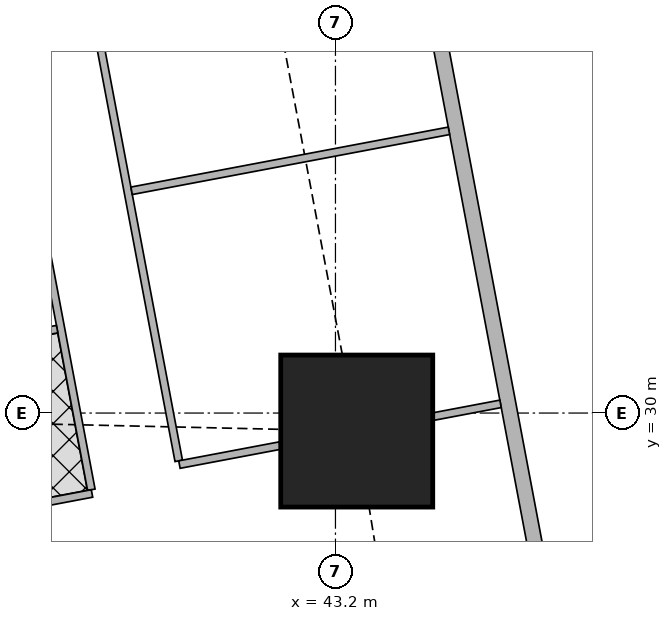
"""IFC4 building model, lengths in metres.
Left out: names, types, materials, properties, quantities, classifications, styles, units other than length and angle.
Written with IfcOpenShell. Run it as: python <this file> out.ifc"""

import sys

from ifc_helpers import new_model, si_unit, direction, frame, frame_2d, origin, origin_2d, place, context, subcontext, project, spatial, rectangle, extrude, element, fill, save


model = new_model("IFC4")
c1 = context("Model", 3, precision=1e-05, world=origin(), true_north=direction((0.0, 1.0)))
c2 = subcontext(c1, "Body", "Model", "MODEL_VIEW")
j1 = project(units=[si_unit("LENGTHUNIT", "METRE"), si_unit("PLANEANGLEUNIT", "RADIAN")], contexts=[c1])
p1 = place(None, origin())
s1 = spatial("IfcSite", under=j1, at=p1, CompositionType="ELEMENT")
p2 = place(p1, origin())
s2 = spatial("IfcBuilding", under=s1, at=p2, CompositionType="ELEMENT")
p3 = place(p2, frame((0.0, 0.0, 262.85)))
s3 = spatial("IfcBuildingStorey", under=s2, at=p3, CompositionType="ELEMENT", Elevation=262.85)
p4 = place(p3, frame((43.48, 29.763, 0.0), z_axis=(0.0, 0.0, 1.0), x_axis=(1.0, 0.0, 0.0)))
e1 = element("IfcColumn", 1, at=p4, inside=s3, PredefinedType="COLUMN", context=c2, shape_type="SweptSolid", body=[
    extrude(rectangle(XDim=2.0, YDim=2.0, at=origin_2d()), origin(), (0.0, 0.0, 1.0), 3.75),
])
p5 = place(p3, frame((49.684, 7.832, 0.0), z_axis=(0.0, 0.0, 1.0), x_axis=(-0.185616669694, 0.982622232565, 0.0)))
e2 = element("IfcWall", 2, at=p5, inside=s3, PredefinedType="SOLIDWALL", context=c2, shape_type="SweptSolid", body=[
    extrude(rectangle(XDim=36.0, YDim=0.2, at=frame_2d((18.0, 0.0))), origin(), (0.0, 0.0, 1.0), 3.5),
])
p6 = place(p5, frame((2.518, 0.0, 0.9)))
e3 = element("IfcOpeningElement", 3, at=p6, cuts=e2, PredefinedType="OPENING", context=c2, shape_type="SweptSolid", body=[
    extrude(rectangle(XDim=2.4, YDim=1.5, at=frame_2d((1.2, 0.75))), frame((0.0, 0.11, 0.0), z_axis=(0.0, -1.0, 0.0), x_axis=(1.0, 0.0, 0.0)), (0.0, 0.0, 1.0), 0.22),
])
p7 = place(p5, frame((8.444, 0.0, 0.9)))
e4 = element("IfcOpeningElement", 4, at=p7, cuts=e2, PredefinedType="OPENING", context=c2, shape_type="SweptSolid", body=[
    extrude(rectangle(XDim=1.8, YDim=1.5, at=frame_2d((0.9, 0.75))), frame((0.0, 0.11, 0.0), z_axis=(0.0, -1.0, 0.0), x_axis=(1.0, 0.0, 0.0)), (0.0, 0.0, 1.0), 0.22),
])
p8 = place(p5, frame((12.261, 0.0, 0.9)))
e5 = element("IfcOpeningElement", 5, at=p8, cuts=e2, PredefinedType="OPENING", context=c2, shape_type="SweptSolid", body=[
    extrude(rectangle(XDim=1.8, YDim=1.5, at=frame_2d((0.9, 0.75))), frame((0.0, 0.11, 0.0), z_axis=(0.0, -1.0, 0.0), x_axis=(1.0, 0.0, 0.0)), (0.0, 0.0, 1.0), 0.22),
])
p9 = place(p5, frame((16.078, 0.0, 0.9)))
e6 = element("IfcOpeningElement", 6, at=p9, cuts=e2, PredefinedType="OPENING", context=c2, shape_type="SweptSolid", body=[
    extrude(rectangle(XDim=1.8, YDim=1.5, at=frame_2d((0.9, 0.75))), frame((0.0, 0.11, 0.0), z_axis=(0.0, -1.0, 0.0), x_axis=(1.0, 0.0, 0.0)), (0.0, 0.0, 1.0), 0.22),
])
p10 = place(p5, frame((19.894, 0.0, 0.9)))
e7 = element("IfcOpeningElement", 7, at=p10, cuts=e2, PredefinedType="OPENING", context=c2, shape_type="SweptSolid", body=[
    extrude(rectangle(XDim=1.8, YDim=1.5, at=frame_2d((0.9, 0.75))), frame((0.0, 0.11, 0.0), z_axis=(0.0, -1.0, 0.0), x_axis=(1.0, 0.0, 0.0)), (0.0, 0.0, 1.0), 0.22),
])
p11 = place(p5, frame((23.71, 0.0, 0.9)))
e8 = element("IfcOpeningElement", 8, at=p11, cuts=e2, PredefinedType="OPENING", context=c2, shape_type="SweptSolid", body=[
    extrude(rectangle(XDim=1.8, YDim=1.5, at=frame_2d((0.9, 0.75))), frame((0.0, 0.11, 0.0), z_axis=(0.0, -1.0, 0.0), x_axis=(1.0, 0.0, 0.0)), (0.0, 0.0, 1.0), 0.22),
])
p12 = place(p5, frame((27.526, 0.0, 0.9)))
e9 = element("IfcOpeningElement", 9, at=p12, cuts=e2, PredefinedType="OPENING", context=c2, shape_type="SweptSolid", body=[
    extrude(rectangle(XDim=1.8, YDim=1.5, at=frame_2d((0.9, 0.75))), frame((0.0, 0.11, 0.0), z_axis=(0.0, -1.0, 0.0), x_axis=(1.0, 0.0, 0.0)), (0.0, 0.0, 1.0), 0.22),
])
p13 = place(p5, frame((32.046, 0.0, 0.9)))
e10 = element("IfcOpeningElement", 10, at=p13, cuts=e2, PredefinedType="OPENING", context=c2, shape_type="SweptSolid", body=[
    extrude(rectangle(XDim=1.8, YDim=1.5, at=frame_2d((0.9, 0.75))), frame((0.0, 0.11, 0.0), z_axis=(0.0, -1.0, 0.0), x_axis=(1.0, 0.0, 0.0)), (0.0, 0.0, 1.0), 0.22),
])
p14 = place(p3, frame((34.036, 42.186, 0.0), z_axis=(0.0, 0.0, 1.0), x_axis=(0.185593518645, -0.9826266055, 0.0)))
e11 = element("IfcWall", 11, at=p14, inside=s3, PredefinedType="SOLIDWALL", context=c2, shape_type="SweptSolid", body=[
    extrude(rectangle(XDim=35.961, YDim=0.15, at=frame_2d((17.98, 0.0))), origin(), (0.0, 0.0, 1.0), 2.5),
])
p15 = place(p14, frame((15.529, 0.0, 0.0)))
e12 = element("IfcOpeningElement", 12, at=p15, cuts=e11, PredefinedType="OPENING", context=c2, shape_type="SweptSolid", body=[
    extrude(rectangle(XDim=1.0, YDim=2.1, at=frame_2d((0.5, 1.05))), frame((0.0, 0.085, 0.0), z_axis=(0.0, -1.0, 0.0), x_axis=(1.0, 0.0, 0.0)), (0.0, 0.0, 1.0), 0.17),
])
p16 = place(p14, frame((19.345, 0.0, 0.0)))
e13 = element("IfcOpeningElement", 13, at=p16, cuts=e11, PredefinedType="OPENING", context=c2, shape_type="SweptSolid", body=[
    extrude(rectangle(XDim=1.0, YDim=2.1, at=frame_2d((0.5, 1.05))), frame((0.0, 0.085, 0.0), z_axis=(0.0, -1.0, 0.0), x_axis=(1.0, 0.0, 0.0)), (0.0, 0.0, 1.0), 0.17),
])
p17 = place(p14, frame((30.594, 0.0, 0.0)))
e14 = element("IfcOpeningElement", 14, at=p17, cuts=e11, PredefinedType="OPENING", context=c2, shape_type="SweptSolid", body=[
    extrude(rectangle(XDim=1.0, YDim=2.1, at=frame_2d((0.5, 1.05))), frame((0.0, 0.085, 0.0), z_axis=(0.0, -1.0, 0.0), x_axis=(1.0, 0.0, 0.0)), (0.0, 0.0, 1.0), 0.17),
])
p18 = place(p3, frame((38.744, 42.045, 0.0), z_axis=(0.0, 0.0, 1.0), x_axis=(0.185614085367, -0.982622720739, 0.0)))
e15 = element("IfcWall", 15, at=p18, inside=s3, PredefinedType="PARTITIONING", context=c2, shape_type="SweptSolid", body=[
    extrude(rectangle(XDim=12.898, YDim=0.1, at=frame_2d((6.449, 0.0))), origin(), (0.0, 0.0, 1.0), 2.5),
])
p19 = place(p18, frame((11.848, 0.0, 0.0)))
e16 = element("IfcOpeningElement", 16, at=p19, cuts=e15, PredefinedType="OPENING", context=c2, shape_type="SweptSolid", body=[
    extrude(rectangle(XDim=0.9, YDim=2.1, at=frame_2d((0.45, 1.05))), frame((0.0, 0.06, 0.0), z_axis=(0.0, -1.0, 0.0), x_axis=(1.0, 0.0, 0.0)), (0.0, 0.0, 1.0), 0.12),
])
p20 = place(p18, frame((8.191, 0.0, 0.0)))
e17 = element("IfcOpeningElement", 17, at=p20, cuts=e15, PredefinedType="OPENING", context=c2, shape_type="SweptSolid", body=[
    extrude(rectangle(XDim=0.9, YDim=2.1, at=frame_2d((0.45, 1.05))), frame((0.0, 0.06, 0.0), z_axis=(0.0, -1.0, 0.0), x_axis=(1.0, 0.0, 0.0)), (0.0, 0.0, 1.0), 0.12),
])
p21 = place(p18, frame((4.215, 0.0, 0.0)))
e18 = element("IfcOpeningElement", 18, at=p21, cuts=e15, PredefinedType="OPENING", context=c2, shape_type="SweptSolid", body=[
    extrude(rectangle(XDim=0.9, YDim=2.1, at=frame_2d((0.45, 1.05))), frame((0.0, 0.06, 0.0), z_axis=(0.0, -1.0, 0.0), x_axis=(1.0, 0.0, 0.0)), (0.0, 0.0, 1.0), 0.12),
])
p22 = place(p3, frame((37.511, 42.109, 0.0), z_axis=(0.0, 0.0, 1.0), x_axis=(0.185550464988, -0.982634736279, 0.0)))
e19 = element("IfcWall", 19, at=p22, inside=s3, PredefinedType="PARTITIONING", context=c2, shape_type="SweptSolid", body=[
    extrude(rectangle(XDim=13.35, YDim=0.1, at=frame_2d((6.675, 0.0))), origin(), (0.0, 0.0, 1.0), 2.5),
])
p23 = place(p22, frame((11.845, 0.0, 0.0)))
e20 = element("IfcOpeningElement", 20, at=p23, cuts=e19, PredefinedType="OPENING", context=c2, shape_type="SweptSolid", body=[
    extrude(rectangle(XDim=0.9, YDim=2.1, at=frame_2d((0.45, 1.05))), frame((0.0, 0.06, 0.0), z_axis=(0.0, -1.0, 0.0), x_axis=(1.0, 0.0, 0.0)), (0.0, 0.0, 1.0), 0.12),
])
p24 = place(p22, frame((8.224, 0.0, 0.0)))
e21 = element("IfcOpeningElement", 21, at=p24, cuts=e19, PredefinedType="OPENING", context=c2, shape_type="SweptSolid", body=[
    extrude(rectangle(XDim=0.9, YDim=2.1, at=frame_2d((0.45, 1.05))), frame((0.0, 0.06, 0.0), z_axis=(0.0, -1.0, 0.0), x_axis=(1.0, 0.0, 0.0)), (0.0, 0.0, 1.0), 0.12),
])
p25 = place(p22, frame((2.65, 0.0, 0.0)))
e22 = element("IfcOpeningElement", 22, at=p25, cuts=e19, PredefinedType="OPENING", context=c2, shape_type="SweptSolid", body=[
    extrude(rectangle(XDim=0.9, YDim=2.1, at=frame_2d((0.45, 1.05))), frame((0.0, 0.06, 0.0), z_axis=(0.0, -1.0, 0.0), x_axis=(1.0, 0.0, 0.0)), (0.0, 0.0, 1.0), 0.12),
])
p26 = place(p22, frame((9.936, 0.0, 0.0)))
e23 = element("IfcOpeningElement", 23, at=p26, cuts=e19, PredefinedType="OPENING", context=c2, shape_type="SweptSolid", body=[
    extrude(rectangle(XDim=0.9, YDim=2.1, at=frame_2d((0.45, 1.05))), frame((0.0, 0.06, 0.0), z_axis=(0.0, -1.0, 0.0), x_axis=(1.0, 0.0, 0.0)), (0.0, 0.0, 1.0), 0.12),
])
p27 = place(p22, frame((5.555, 0.0, 0.0)))
e24 = element("IfcOpeningElement", 24, at=p27, cuts=e19, PredefinedType="OPENING", context=c2, shape_type="SweptSolid", body=[
    extrude(rectangle(XDim=0.9, YDim=2.1, at=frame_2d((0.45, 1.05))), frame((0.0, 0.06, 0.0), z_axis=(0.0, -1.0, 0.0), x_axis=(1.0, 0.0, 0.0)), (0.0, 0.0, 1.0), 0.12),
])
p28 = place(p3, frame((44.693, 33.713, 0.0), z_axis=(0.0, 0.0, 1.0), x_axis=(-0.982615600536, -0.185651775062, 0.0)))
e25 = element("IfcWall", 25, at=p28, inside=s3, PredefinedType="PARTITIONING", context=c2, shape_type="SweptSolid", body=[
    extrude(rectangle(XDim=4.249, YDim=0.1, at=frame_2d((2.125, 0.0))), origin(), (0.0, 0.0, 1.0), 2.5),
])
p29 = place(p3, frame((45.372, 30.121, 0.0), z_axis=(0.0, 0.0, 1.0), x_axis=(-0.982547416156, -0.186012297994, 0.0)))
e26 = element("IfcWall", 26, at=p29, inside=s3, PredefinedType="PARTITIONING", context=c2, shape_type="SweptSolid", body=[
    extrude(rectangle(XDim=0.898, YDim=0.1, at=frame_2d((0.449, 0.0))), origin(), (0.0, 0.0, 1.0), 3.5),
])
p30 = place(p3, frame((42.47, 29.572, 0.0), z_axis=(0.0, 0.0, 1.0), x_axis=(-0.982610503289, -0.185678751683, 0.0)))
e27 = element("IfcWall", 27, at=p30, inside=s3, PredefinedType="PARTITIONING", context=c2, shape_type="SweptSolid", body=[
    extrude(rectangle(XDim=1.346, YDim=0.1, at=frame_2d((0.673, 0.0))), origin(), (0.0, 0.0, 1.0), 2.5),
])
p31 = place(p3, frame((39.997, 28.942, 0.0), z_axis=(0.0, 0.0, 1.0), x_axis=(-0.982569883123, -0.185893584556, 0.0)))
e28 = element("IfcWall", 28, at=p31, inside=s3, PredefinedType="PARTITIONING", context=c2, shape_type="SweptSolid", body=[
    extrude(rectangle(XDim=3.324, YDim=0.1, at=frame_2d((1.662, 0.0))), origin(), (0.0, 0.0, 1.0), 3.5),
])
p32 = place(p3, frame((39.538, 31.104, 0.0), z_axis=(0.0, 0.0, 1.0), x_axis=(-0.982620626894, -0.185625169636, 0.0)))
e29 = element("IfcWall", 29, at=p32, inside=s3, PredefinedType="PARTITIONING", context=c2, shape_type="SweptSolid", body=[
    extrude(rectangle(XDim=3.275, YDim=0.1, at=frame_2d((1.637, 0.0))), origin(), (0.0, 0.0, 1.0), 2.5),
])
p33 = place(p10, origin())
e30 = element("IfcWindow", 30, at=p33, inside=s3, PartitioningType="SINGLE_PANEL", PredefinedType="WINDOW", context=c2, shape_type="SweptSolid", body=[
    extrude(rectangle(XDim=1.8, YDim=1.5, at=frame_2d((0.9, 0.75))), frame((0.0, 0.03, 0.0), z_axis=(0.0, -1.0, 0.0), x_axis=(1.0, 0.0, 0.0)), (0.0, 0.0, 1.0), 0.06),
])
fill(e7, e30)
p34 = place(p11, origin())
e31 = element("IfcWindow", 31, at=p34, inside=s3, PartitioningType="SINGLE_PANEL", PredefinedType="WINDOW", context=c2, shape_type="SweptSolid", body=[
    extrude(rectangle(XDim=1.8, YDim=1.5, at=frame_2d((0.9, 0.75))), frame((0.0, 0.03, 0.0), z_axis=(0.0, -1.0, 0.0), x_axis=(1.0, 0.0, 0.0)), (0.0, 0.0, 1.0), 0.06),
])
fill(e8, e31)
p35 = place(p19, origin())
e32 = element("IfcDoor", 32, at=p35, inside=s3, OperationType="SINGLE_SWING_RIGHT", PredefinedType="DOOR", context=c2, shape_type="SweptSolid", body=[
    extrude(rectangle(XDim=0.9, YDim=2.1, at=frame_2d((0.45, 1.05))), frame((0.0, 0.025, 0.0), z_axis=(0.0, -1.0, 0.0), x_axis=(1.0, 0.0, 0.0)), (0.0, 0.0, 1.0), 0.05),
])
fill(e16, e32)
p36 = place(p20, origin())
e33 = element("IfcDoor", 33, at=p36, inside=s3, OperationType="SINGLE_SWING_RIGHT", PredefinedType="DOOR", context=c2, shape_type="SweptSolid", body=[
    extrude(rectangle(XDim=0.9, YDim=2.1, at=frame_2d((0.45, 1.05))), frame((0.0, 0.025, 0.0), z_axis=(0.0, -1.0, 0.0), x_axis=(1.0, 0.0, 0.0)), (0.0, 0.0, 1.0), 0.05),
])
fill(e17, e33)
p37 = place(p23, origin())
e34 = element("IfcDoor", 34, at=p37, inside=s3, OperationType="SINGLE_SWING_LEFT", PredefinedType="DOOR", context=c2, shape_type="SweptSolid", body=[
    extrude(rectangle(XDim=0.9, YDim=2.1, at=frame_2d((0.45, 1.05))), frame((0.0, 0.025, 0.0), z_axis=(0.0, -1.0, 0.0), x_axis=(1.0, 0.0, 0.0)), (0.0, 0.0, 1.0), 0.05),
])
fill(e20, e34)
p38 = place(p26, origin())
e35 = element("IfcDoor", 35, at=p38, inside=s3, OperationType="SINGLE_SWING_LEFT", PredefinedType="DOOR", context=c2, shape_type="SweptSolid", body=[
    extrude(rectangle(XDim=0.9, YDim=2.1, at=frame_2d((0.45, 1.05))), frame((0.0, 0.025, 0.0), z_axis=(0.0, -1.0, 0.0), x_axis=(1.0, 0.0, 0.0)), (0.0, 0.0, 1.0), 0.05),
])
fill(e23, e35)
save(model, sys.argv[1])
